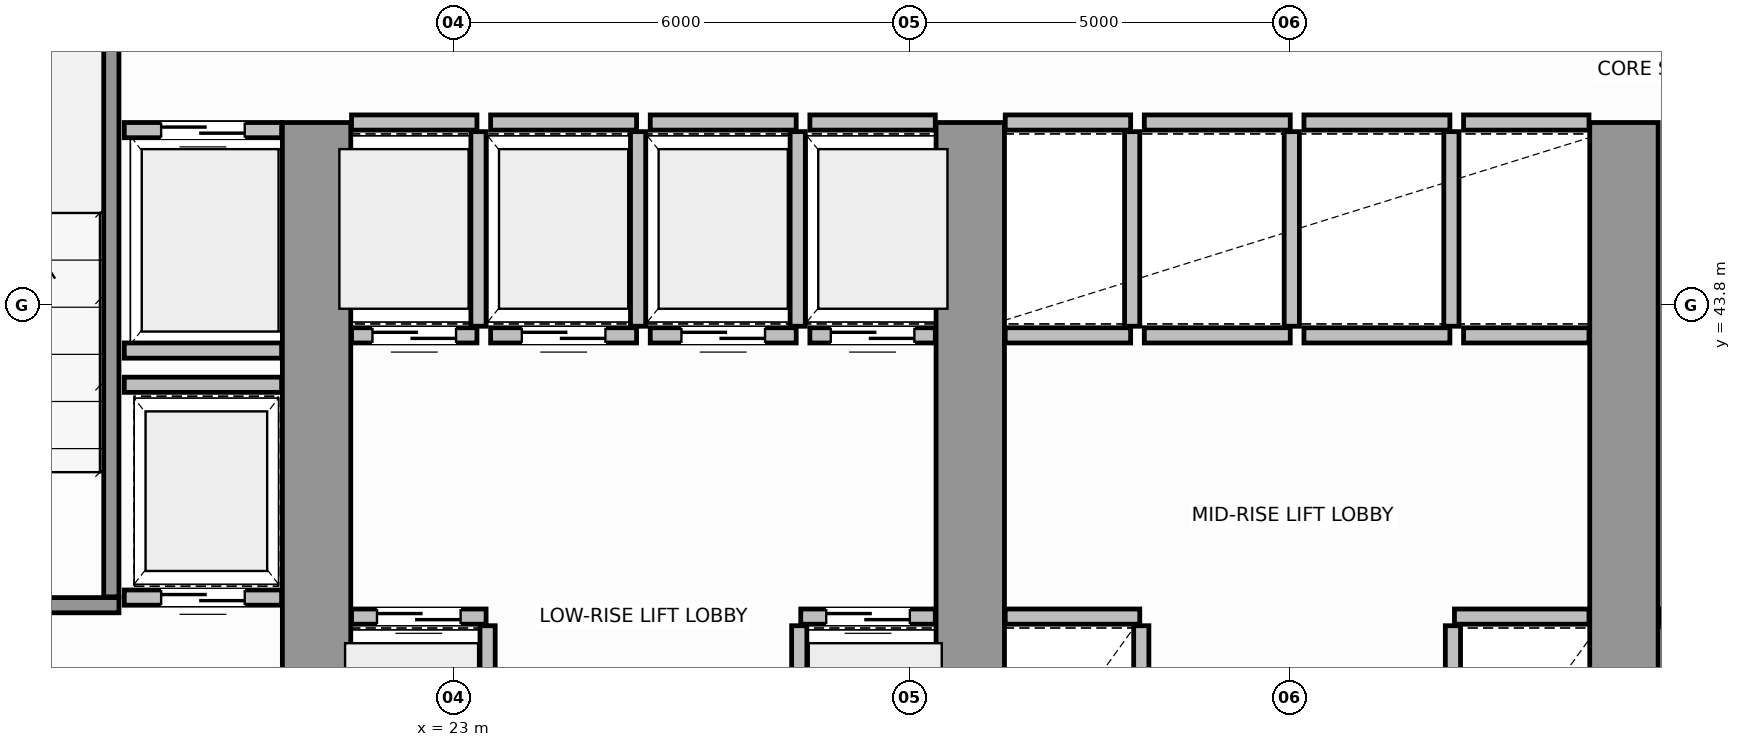
"""IFC4 building model, lengths in metres.
Left out: names, types, materials, properties, quantities, classifications, styles, units other than length and angle.
Written with IfcOpenShell. Run it as: python <this file> out.ifc"""

import sys

from ifc_helpers import new_model, si_unit, direction, frame, frame_2d, origin, place, context, subcontext, project, spatial, rectangle, extrude, source, transform, mapped, element, fill, save


model = new_model("IFC4")
c1 = context("Model", 3, precision=1e-05, world=origin(), true_north=direction((0.0, 1.0)))
c2 = subcontext(c1, "Body", "Model", "MODEL_VIEW")
j1 = project(units=[si_unit("LENGTHUNIT", "METRE"), si_unit("PLANEANGLEUNIT", "RADIAN")], contexts=[c1])
p1 = place(None, origin())
s1 = spatial("IfcSite", under=j1, at=p1, CompositionType="ELEMENT")
p2 = place(p1, origin())
s2 = spatial("IfcBuilding", under=s1, at=p2, CompositionType="ELEMENT")
p3 = place(p2, frame((0.0, 0.0, 22.6)))
s3 = spatial("IfcBuildingStorey", under=s2, at=p3, CompositionType="ELEMENT", Elevation=22.6)
for number, where, z_axis, x_axis in (
    (1, (21.2, 36.97, 0.0), (0.0, 0.0, 1.0), (0.0, 1.0, 0.0)),
    (2, (29.8, 36.97, 0.0), (0.0, 0.0, 1.0), (0.0, 1.0, 0.0)),
    (3, (38.4, 36.97, 0.0), (0.0, 0.0, 1.0), (0.0, 1.0, 0.0)),
):
    element("IfcWall", number, at=place(p3, frame(where, z_axis=z_axis, x_axis=x_axis)), inside=s3, PredefinedType="SHEAR", context=c2, shape_type="SweptSolid", body=[
        extrude(rectangle(XDim=9.23, YDim=0.9, at=frame_2d((4.615, 0.0))), origin(), (0.0, 0.0, 1.0), 3.8),
    ])
p4 = place(p3, frame((14.45, 39.85, 0.0), z_axis=(0.0, 0.0, 1.0), x_axis=(1.0, 0.0, 0.0)))
e4 = element("IfcWall", 4, at=p4, inside=s3, PredefinedType="SOLIDWALL", context=c2, shape_type="SweptSolid", body=[
    extrude(rectangle(XDim=4.15, YDim=0.2, at=frame_2d((2.075, 0.0))), origin(), (0.0, 0.0, 1.0), 3.8),
])
p5 = place(p4, frame((1.725, 0.0, 0.0)))
e5 = element("IfcOpeningElement", 5, at=p5, cuts=e4, PredefinedType="OPENING", context=c2, shape_type="SweptSolid", body=[
    extrude(rectangle(XDim=1.1, YDim=2.15, at=frame_2d((0.55, 1.075))), frame((0.0, 0.11, 0.0), z_axis=(0.0, -1.0, 0.0), x_axis=(1.0, 0.0, 0.0)), (0.0, 0.0, 1.0), 0.22),
])
p6 = place(p3, frame((18.5, 39.96, 0.0), z_axis=(0.0, 0.0, 1.0), x_axis=(0.0, 1.0, 0.0)))
e6 = element("IfcWall", 6, at=p6, inside=s3, PredefinedType="SOLIDWALL", context=c2, shape_type="SweptSolid", body=[
    extrude(rectangle(XDim=9.93, YDim=0.2, at=frame_2d((4.965, 0.0))), origin(), (0.0, 0.0, 1.0), 3.8),
])
p7 = place(p3, frame((21.66, 39.7, 0.0), z_axis=(0.0, 0.0, 1.0), x_axis=(1.0, 0.0, 0.0)))
e7 = element("IfcWall", 7, at=p7, inside=s3, PredefinedType="SOLIDWALL", context=c2, shape_type="SweptSolid", body=[
    extrude(rectangle(XDim=1.77, YDim=0.2, at=frame_2d((0.885, 0.0))), origin(), (0.0, 0.0, 1.0), 3.58),
])
p8 = place(p7, frame((0.335, 0.0, 0.0)))
e8 = element("IfcOpeningElement", 8, at=p8, cuts=e7, PredefinedType="OPENING", context=c2, shape_type="SweptSolid", body=[
    extrude(rectangle(XDim=1.1, YDim=2.15, at=frame_2d((0.55, 1.075))), frame((0.0, 0.11, 0.0), z_axis=(0.0, -1.0, 0.0), x_axis=(1.0, 0.0, 0.0)), (0.0, 0.0, 1.0), 0.22),
])
p9 = place(p3, frame((23.45, 37.02, 0.0), z_axis=(0.0, 0.0, 1.0), x_axis=(0.0, 1.0, 0.0)))
e9 = element("IfcWall", 9, at=p9, inside=s3, PredefinedType="SOLIDWALL", context=c2, shape_type="SweptSolid", body=[
    extrude(rectangle(XDim=2.56, YDim=0.2, at=frame_2d((1.28, 0.0))), origin(), (0.0, 0.0, 1.0), 3.58),
])
p10 = place(p3, frame((27.57, 39.7, 0.0), z_axis=(0.0, 0.0, 1.0), x_axis=(1.0, 0.0, 0.0)))
e10 = element("IfcWall", 10, at=p10, inside=s3, PredefinedType="SOLIDWALL", context=c2, shape_type="SweptSolid", body=[
    extrude(rectangle(XDim=1.77, YDim=0.2, at=frame_2d((0.885, 0.0))), origin(), (0.0, 0.0, 1.0), 3.58),
])
p11 = place(p10, frame((0.335, 0.0, 0.0)))
e11 = element("IfcOpeningElement", 11, at=p11, cuts=e10, PredefinedType="OPENING", context=c2, shape_type="SweptSolid", body=[
    extrude(rectangle(XDim=1.1, YDim=2.15, at=frame_2d((0.55, 1.075))), frame((0.0, 0.11, 0.0), z_axis=(0.0, -1.0, 0.0), x_axis=(1.0, 0.0, 0.0)), (0.0, 0.0, 1.0), 0.22),
])
p12 = place(p3, frame((27.55, 37.02, 0.0), z_axis=(0.0, 0.0, 1.0), x_axis=(0.0, 1.0, 0.0)))
e12 = element("IfcWall", 12, at=p12, inside=s3, PredefinedType="SOLIDWALL", context=c2, shape_type="SweptSolid", body=[
    extrude(rectangle(XDim=2.56, YDim=0.2, at=frame_2d((1.28, 0.0))), origin(), (0.0, 0.0, 1.0), 3.58),
])
p13 = place(p3, frame((21.66, 43.4, 0.0), z_axis=(0.0, 0.0, 1.0), x_axis=(1.0, 0.0, 0.0)))
e13 = element("IfcWall", 13, at=p13, inside=s3, PredefinedType="SOLIDWALL", context=c2, shape_type="SweptSolid", body=[
    extrude(rectangle(XDim=1.65, YDim=0.2, at=frame_2d((0.825, 0.0))), origin(), (0.0, 0.0, 1.0), 3.58),
])
p14 = place(p13, frame((0.275, 0.0, 0.0)))
e14 = element("IfcOpeningElement", 14, at=p14, cuts=e13, PredefinedType="OPENING", context=c2, shape_type="SweptSolid", body=[
    extrude(rectangle(XDim=1.1, YDim=2.15, at=frame_2d((0.55, 1.075))), frame((0.0, 0.11, 0.0), z_axis=(0.0, -1.0, 0.0), x_axis=(1.0, 0.0, 0.0)), (0.0, 0.0, 1.0), 0.22),
])
p15 = place(p3, frame((21.66, 46.2, 0.0), z_axis=(0.0, 0.0, 1.0), x_axis=(1.0, 0.0, 0.0)))
e15 = element("IfcWall", 15, at=p15, inside=s3, PredefinedType="SOLIDWALL", context=c2, shape_type="SweptSolid", body=[
    extrude(rectangle(XDim=1.65, YDim=0.2, at=frame_2d((0.825, 0.0))), origin(), (0.0, 0.0, 1.0), 3.58),
])
p16 = place(p3, frame((23.33, 43.52, 0.0), z_axis=(0.0, 0.0, 1.0), x_axis=(0.0, 1.0, 0.0)))
e16 = element("IfcWall", 16, at=p16, inside=s3, PredefinedType="SOLIDWALL", context=c2, shape_type="SweptSolid", body=[
    extrude(rectangle(XDim=2.56, YDim=0.2, at=frame_2d((1.28, 0.0))), origin(), (0.0, 0.0, 1.0), 3.58),
])
p17 = place(p3, frame((23.49, 43.4, 0.0), z_axis=(0.0, 0.0, 1.0), x_axis=(1.0, 0.0, 0.0)))
e17 = element("IfcWall", 17, at=p17, inside=s3, PredefinedType="SOLIDWALL", context=c2, shape_type="SweptSolid", body=[
    extrude(rectangle(XDim=1.92, YDim=0.2, at=frame_2d((0.96, 0.0))), origin(), (0.0, 0.0, 1.0), 3.58),
])
p18 = place(p17, frame((0.41, 0.0, 0.0)))
e18 = element("IfcOpeningElement", 18, at=p18, cuts=e17, PredefinedType="OPENING", context=c2, shape_type="SweptSolid", body=[
    extrude(rectangle(XDim=1.1, YDim=2.15, at=frame_2d((0.55, 1.075))), frame((0.0, 0.11, 0.0), z_axis=(0.0, -1.0, 0.0), x_axis=(1.0, 0.0, 0.0)), (0.0, 0.0, 1.0), 0.22),
])
p19 = place(p3, frame((23.49, 46.2, 0.0), z_axis=(0.0, 0.0, 1.0), x_axis=(1.0, 0.0, 0.0)))
e19 = element("IfcWall", 19, at=p19, inside=s3, PredefinedType="SOLIDWALL", context=c2, shape_type="SweptSolid", body=[
    extrude(rectangle(XDim=1.92, YDim=0.2, at=frame_2d((0.96, 0.0))), origin(), (0.0, 0.0, 1.0), 3.58),
])
p20 = place(p3, frame((25.43, 43.52, 0.0), z_axis=(0.0, 0.0, 1.0), x_axis=(0.0, 1.0, 0.0)))
e20 = element("IfcWall", 20, at=p20, inside=s3, PredefinedType="SOLIDWALL", context=c2, shape_type="SweptSolid", body=[
    extrude(rectangle(XDim=2.56, YDim=0.2, at=frame_2d((1.28, 0.0))), origin(), (0.0, 0.0, 1.0), 3.58),
])
p21 = place(p3, frame((25.59, 43.4, 0.0), z_axis=(0.0, 0.0, 1.0), x_axis=(1.0, 0.0, 0.0)))
e21 = element("IfcWall", 21, at=p21, inside=s3, PredefinedType="SOLIDWALL", context=c2, shape_type="SweptSolid", body=[
    extrude(rectangle(XDim=1.92, YDim=0.2, at=frame_2d((0.96, 0.0))), origin(), (0.0, 0.0, 1.0), 3.58),
])
p22 = place(p21, frame((0.41, 0.0, 0.0)))
e22 = element("IfcOpeningElement", 22, at=p22, cuts=e21, PredefinedType="OPENING", context=c2, shape_type="SweptSolid", body=[
    extrude(rectangle(XDim=1.1, YDim=2.15, at=frame_2d((0.55, 1.075))), frame((0.0, 0.11, 0.0), z_axis=(0.0, -1.0, 0.0), x_axis=(1.0, 0.0, 0.0)), (0.0, 0.0, 1.0), 0.22),
])
p23 = place(p3, frame((25.59, 46.2, 0.0), z_axis=(0.0, 0.0, 1.0), x_axis=(1.0, 0.0, 0.0)))
e23 = element("IfcWall", 23, at=p23, inside=s3, PredefinedType="SOLIDWALL", context=c2, shape_type="SweptSolid", body=[
    extrude(rectangle(XDim=1.92, YDim=0.2, at=frame_2d((0.96, 0.0))), origin(), (0.0, 0.0, 1.0), 3.58),
])
p24 = place(p3, frame((27.53, 43.52, 0.0), z_axis=(0.0, 0.0, 1.0), x_axis=(0.0, 1.0, 0.0)))
e24 = element("IfcWall", 24, at=p24, inside=s3, PredefinedType="SOLIDWALL", context=c2, shape_type="SweptSolid", body=[
    extrude(rectangle(XDim=2.56, YDim=0.2, at=frame_2d((1.28, 0.0))), origin(), (0.0, 0.0, 1.0), 3.58),
])
p25 = place(p3, frame((27.69, 43.4, 0.0), z_axis=(0.0, 0.0, 1.0), x_axis=(1.0, 0.0, 0.0)))
e25 = element("IfcWall", 25, at=p25, inside=s3, PredefinedType="SOLIDWALL", context=c2, shape_type="SweptSolid", body=[
    extrude(rectangle(XDim=1.65, YDim=0.2, at=frame_2d((0.825, 0.0))), origin(), (0.0, 0.0, 1.0), 3.58),
])
p26 = place(p25, frame((0.275, 0.0, 0.0)))
e26 = element("IfcOpeningElement", 26, at=p26, cuts=e25, PredefinedType="OPENING", context=c2, shape_type="SweptSolid", body=[
    extrude(rectangle(XDim=1.1, YDim=2.15, at=frame_2d((0.55, 1.075))), frame((0.0, 0.11, 0.0), z_axis=(0.0, -1.0, 0.0), x_axis=(1.0, 0.0, 0.0)), (0.0, 0.0, 1.0), 0.22),
])
p27 = place(p3, frame((27.69, 46.2, 0.0), z_axis=(0.0, 0.0, 1.0), x_axis=(1.0, 0.0, 0.0)))
e27 = element("IfcWall", 27, at=p27, inside=s3, PredefinedType="SOLIDWALL", context=c2, shape_type="SweptSolid", body=[
    extrude(rectangle(XDim=1.65, YDim=0.2, at=frame_2d((0.825, 0.0))), origin(), (0.0, 0.0, 1.0), 3.58),
])
p28 = place(p3, frame((30.26, 39.7, 0.0), z_axis=(0.0, 0.0, 1.0), x_axis=(1.0, 0.0, 0.0)))
e28 = element("IfcWall", 28, at=p28, inside=s3, PredefinedType="SOLIDWALL", context=c2, shape_type="SweptSolid", body=[
    extrude(rectangle(XDim=1.77, YDim=0.2, at=frame_2d((0.885, 0.0))), origin(), (0.0, 0.0, 1.0), 3.58),
])
p29 = place(p3, frame((32.05, 37.02, 0.0), z_axis=(0.0, 0.0, 1.0), x_axis=(0.0, 1.0, 0.0)))
e29 = element("IfcWall", 29, at=p29, inside=s3, PredefinedType="SOLIDWALL", context=c2, shape_type="SweptSolid", body=[
    extrude(rectangle(XDim=2.56, YDim=0.2, at=frame_2d((1.28, 0.0))), origin(), (0.0, 0.0, 1.0), 3.58),
])
p30 = place(p3, frame((36.17, 39.7, 0.0), z_axis=(0.0, 0.0, 1.0), x_axis=(1.0, 0.0, 0.0)))
e30 = element("IfcWall", 30, at=p30, inside=s3, PredefinedType="SOLIDWALL", context=c2, shape_type="SweptSolid", body=[
    extrude(rectangle(XDim=1.77, YDim=0.2, at=frame_2d((0.885, 0.0))), origin(), (0.0, 0.0, 1.0), 3.58),
])
p31 = place(p3, frame((36.15, 37.02, 0.0), z_axis=(0.0, 0.0, 1.0), x_axis=(0.0, 1.0, 0.0)))
e31 = element("IfcWall", 31, at=p31, inside=s3, PredefinedType="SOLIDWALL", context=c2, shape_type="SweptSolid", body=[
    extrude(rectangle(XDim=2.56, YDim=0.2, at=frame_2d((1.28, 0.0))), origin(), (0.0, 0.0, 1.0), 3.58),
])
for number, where, z_axis, x_axis in (
    (32, (30.26, 43.4, 0.0), (0.0, 0.0, 1.0), (1.0, 0.0, 0.0)),
    (33, (30.26, 46.2, 0.0), (0.0, 0.0, 1.0), (1.0, 0.0, 0.0)),
):
    element("IfcWall", number, at=place(p3, frame(where, z_axis=z_axis, x_axis=x_axis)), inside=s3, PredefinedType="SOLIDWALL", context=c2, shape_type="SweptSolid", body=[
        extrude(rectangle(XDim=1.65, YDim=0.2, at=frame_2d((0.825, 0.0))), origin(), (0.0, 0.0, 1.0), 3.58),
    ])
p32 = place(p3, frame((31.93, 43.52, 0.0), z_axis=(0.0, 0.0, 1.0), x_axis=(0.0, 1.0, 0.0)))
e34 = element("IfcWall", 34, at=p32, inside=s3, PredefinedType="SOLIDWALL", context=c2, shape_type="SweptSolid", body=[
    extrude(rectangle(XDim=2.56, YDim=0.2, at=frame_2d((1.28, 0.0))), origin(), (0.0, 0.0, 1.0), 3.58),
])
for number, where, z_axis, x_axis in (
    (35, (32.09, 43.4, 0.0), (0.0, 0.0, 1.0), (1.0, 0.0, 0.0)),
    (36, (32.09, 46.2, 0.0), (0.0, 0.0, 1.0), (1.0, 0.0, 0.0)),
):
    element("IfcWall", number, at=place(p3, frame(where, z_axis=z_axis, x_axis=x_axis)), inside=s3, PredefinedType="SOLIDWALL", context=c2, shape_type="SweptSolid", body=[
        extrude(rectangle(XDim=1.92, YDim=0.2, at=frame_2d((0.96, 0.0))), origin(), (0.0, 0.0, 1.0), 3.58),
    ])
p33 = place(p3, frame((34.03, 43.52, 0.0), z_axis=(0.0, 0.0, 1.0), x_axis=(0.0, 1.0, 0.0)))
e37 = element("IfcWall", 37, at=p33, inside=s3, PredefinedType="SOLIDWALL", context=c2, shape_type="SweptSolid", body=[
    extrude(rectangle(XDim=2.56, YDim=0.2, at=frame_2d((1.28, 0.0))), origin(), (0.0, 0.0, 1.0), 3.58),
])
for number, where, z_axis, x_axis in (
    (38, (34.19, 43.4, 0.0), (0.0, 0.0, 1.0), (1.0, 0.0, 0.0)),
    (39, (34.19, 46.2, 0.0), (0.0, 0.0, 1.0), (1.0, 0.0, 0.0)),
):
    element("IfcWall", number, at=place(p3, frame(where, z_axis=z_axis, x_axis=x_axis)), inside=s3, PredefinedType="SOLIDWALL", context=c2, shape_type="SweptSolid", body=[
        extrude(rectangle(XDim=1.92, YDim=0.2, at=frame_2d((0.96, 0.0))), origin(), (0.0, 0.0, 1.0), 3.58),
    ])
p34 = place(p3, frame((36.13, 43.52, 0.0), z_axis=(0.0, 0.0, 1.0), x_axis=(0.0, 1.0, 0.0)))
e40 = element("IfcWall", 40, at=p34, inside=s3, PredefinedType="SOLIDWALL", context=c2, shape_type="SweptSolid", body=[
    extrude(rectangle(XDim=2.56, YDim=0.2, at=frame_2d((1.28, 0.0))), origin(), (0.0, 0.0, 1.0), 3.58),
])
for number, where, z_axis, x_axis in (
    (41, (36.29, 43.4, 0.0), (0.0, 0.0, 1.0), (1.0, 0.0, 0.0)),
    (42, (36.29, 46.2, 0.0), (0.0, 0.0, 1.0), (1.0, 0.0, 0.0)),
):
    element("IfcWall", number, at=place(p3, frame(where, z_axis=z_axis, x_axis=x_axis)), inside=s3, PredefinedType="SOLIDWALL", context=c2, shape_type="SweptSolid", body=[
        extrude(rectangle(XDim=1.65, YDim=0.2, at=frame_2d((0.825, 0.0))), origin(), (0.0, 0.0, 1.0), 3.58),
    ])
p35 = place(p3, frame((38.86, 39.7, 0.0), z_axis=(0.0, 0.0, 1.0), x_axis=(1.0, 0.0, 0.0)))
e43 = element("IfcWall", 43, at=p35, inside=s3, PredefinedType="SOLIDWALL", context=c2, shape_type="SweptSolid", body=[
    extrude(rectangle(XDim=1.77, YDim=0.2, at=frame_2d((0.885, 0.0))), origin(), (0.0, 0.0, 1.0), 3.58),
])
p36 = place(p3, frame((18.67, 46.1, 0.0), z_axis=(0.0, 0.0, 1.0), x_axis=(1.0, 0.0, 0.0)))
e44 = element("IfcWall", 44, at=p36, inside=s3, PredefinedType="SOLIDWALL", context=c2, shape_type="SweptSolid", body=[
    extrude(rectangle(XDim=2.07, YDim=0.2, at=frame_2d((1.035, 0.0))), origin(), (0.0, 0.0, 1.0), 3.58),
])
p37 = place(p36, frame((0.485, 0.0, 0.0)))
e45 = element("IfcOpeningElement", 45, at=p37, cuts=e44, PredefinedType="OPENING", context=c2, shape_type="SweptSolid", body=[
    extrude(rectangle(XDim=1.1, YDim=2.15, at=frame_2d((0.55, 1.075))), frame((0.0, 0.11, 0.0), z_axis=(0.0, -1.0, 0.0), x_axis=(1.0, 0.0, 0.0)), (0.0, 0.0, 1.0), 0.22),
])
p38 = place(p3, frame((18.67, 43.2, 0.0), z_axis=(0.0, 0.0, 1.0), x_axis=(1.0, 0.0, 0.0)))
e46 = element("IfcWall", 46, at=p38, inside=s3, PredefinedType="SOLIDWALL", context=c2, shape_type="SweptSolid", body=[
    extrude(rectangle(XDim=2.07, YDim=0.2, at=frame_2d((1.035, 0.0))), origin(), (0.0, 0.0, 1.0), 3.58),
])
p39 = place(p3, frame((18.67, 39.95, 0.0), z_axis=(0.0, 0.0, 1.0), x_axis=(1.0, 0.0, 0.0)))
e47 = element("IfcWall", 47, at=p39, inside=s3, PredefinedType="SOLIDWALL", context=c2, shape_type="SweptSolid", body=[
    extrude(rectangle(XDim=2.07, YDim=0.2, at=frame_2d((1.035, 0.0))), origin(), (0.0, 0.0, 1.0), 3.58),
])
p40 = place(p39, frame((0.485, 0.0, 0.0)))
e48 = element("IfcOpeningElement", 48, at=p40, cuts=e47, PredefinedType="OPENING", context=c2, shape_type="SweptSolid", body=[
    extrude(rectangle(XDim=1.1, YDim=2.15, at=frame_2d((0.55, 1.075))), frame((0.0, 0.11, 0.0), z_axis=(0.0, -1.0, 0.0), x_axis=(1.0, 0.0, 0.0)), (0.0, 0.0, 1.0), 0.22),
])
p41 = place(p3, frame((18.67, 42.75, 0.0), z_axis=(0.0, 0.0, 1.0), x_axis=(1.0, 0.0, 0.0)))
e49 = element("IfcWall", 49, at=p41, inside=s3, PredefinedType="SOLIDWALL", context=c2, shape_type="SweptSolid", body=[
    extrude(rectangle(XDim=2.07, YDim=0.2, at=frame_2d((1.035, 0.0))), origin(), (0.0, 0.0, 1.0), 3.58),
])
m1 = source(origin(), c2, "Body", "SweptSolid", [
    extrude(rectangle(XDim=1.1, YDim=2.15, at=frame_2d((0.55, 1.075))), frame((0.0, 0.025, 0.0), z_axis=(0.0, -1.0, 0.0), x_axis=(1.0, 0.0, 0.0)), (0.0, 0.0, 1.0), 0.05),
])
p42 = place(p8, origin())
e50 = element("IfcDoor", 50, at=p42, inside=s3, OperationType="DOUBLE_DOOR_SLIDING", PredefinedType="DOOR", context=c2, shape_type="MappedRepresentation", body=[
    mapped(m1, transform((0.0, 0.0, 0.0), scale=1.0)),
])
fill(e8, e50)
p43 = place(p11, origin())
e51 = element("IfcDoor", 51, at=p43, inside=s3, OperationType="DOUBLE_DOOR_SLIDING", PredefinedType="DOOR", context=c2, shape_type="MappedRepresentation", body=[
    mapped(m1, transform((0.0, 0.0, 0.0), scale=1.0)),
])
fill(e11, e51)
p44 = place(p14, origin())
e52 = element("IfcDoor", 52, at=p44, inside=s3, OperationType="DOUBLE_DOOR_SLIDING", PredefinedType="DOOR", context=c2, shape_type="MappedRepresentation", body=[
    mapped(m1, transform((0.0, 0.0, 0.0), scale=1.0)),
])
fill(e14, e52)
p45 = place(p18, origin())
e53 = element("IfcDoor", 53, at=p45, inside=s3, OperationType="DOUBLE_DOOR_SLIDING", PredefinedType="DOOR", context=c2, shape_type="MappedRepresentation", body=[
    mapped(m1, transform((0.0, 0.0, 0.0), scale=1.0)),
])
fill(e18, e53)
p46 = place(p22, origin())
e54 = element("IfcDoor", 54, at=p46, inside=s3, OperationType="DOUBLE_DOOR_SLIDING", PredefinedType="DOOR", context=c2, shape_type="MappedRepresentation", body=[
    mapped(m1, transform((0.0, 0.0, 0.0), scale=1.0)),
])
fill(e22, e54)
p47 = place(p26, origin())
e55 = element("IfcDoor", 55, at=p47, inside=s3, OperationType="DOUBLE_DOOR_SLIDING", PredefinedType="DOOR", context=c2, shape_type="MappedRepresentation", body=[
    mapped(m1, transform((0.0, 0.0, 0.0), scale=1.0)),
])
fill(e26, e55)
p48 = place(p37, origin())
e56 = element("IfcDoor", 56, at=p48, inside=s3, OperationType="DOUBLE_DOOR_SLIDING", PredefinedType="DOOR", context=c2, shape_type="MappedRepresentation", body=[
    mapped(m1, transform((0.0, 0.0, 0.0), scale=1.0)),
])
fill(e45, e56)
p49 = place(p40, origin())
e57 = element("IfcDoor", 57, at=p49, inside=s3, OperationType="DOUBLE_DOOR_SLIDING", PredefinedType="DOOR", context=c2, shape_type="MappedRepresentation", body=[
    mapped(m1, transform((0.0, 0.0, 0.0), scale=1.0)),
])
fill(e48, e57)
save(model, sys.argv[1])
